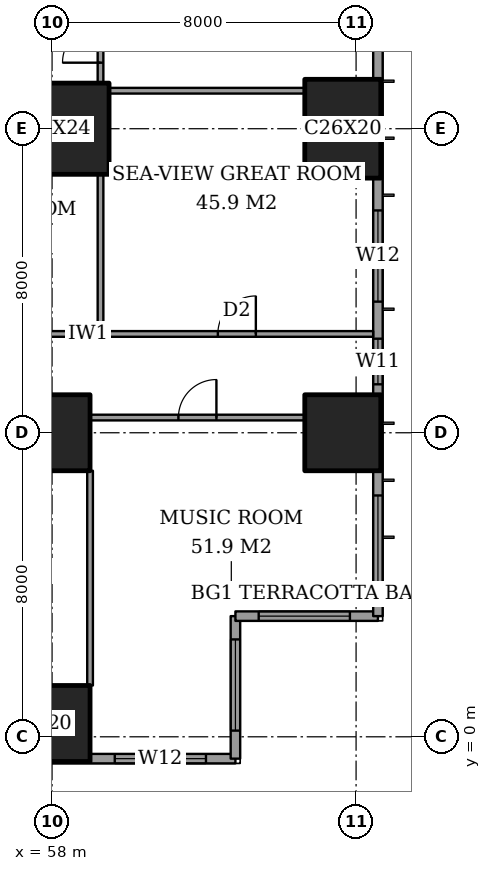
"""IFC4 building model, lengths in metres.
Left out: names, types, materials, properties, quantities, classifications, styles, units other than length and angle.
Written with IfcOpenShell. Run it as: python <this file> out.ifc"""

import sys

from ifc_helpers import new_model, si_unit, direction, frame, frame_2d, origin, origin_2d, place, context, subcontext, project, spatial, rectangle, extrude, element, fill, save


model = new_model("IFC4")
c1 = context("Model", 3, precision=1e-05, world=origin(), true_north=direction((0.0, 1.0)))
c2 = subcontext(c1, "Body", "Model", "MODEL_VIEW")
j1 = project(units=[si_unit("LENGTHUNIT", "METRE"), si_unit("PLANEANGLEUNIT", "RADIAN")], contexts=[c1])
p1 = place(None, origin())
s1 = spatial("IfcSite", under=j1, at=p1, CompositionType="ELEMENT")
p2 = place(p1, origin())
s2 = spatial("IfcBuilding", under=s1, at=p2, CompositionType="ELEMENT")
p3 = place(p2, frame((0.0, 0.0, 150.2)))
s3 = spatial("IfcBuildingStorey", under=s2, at=p3, CompositionType="ELEMENT", Elevation=150.2)
for number, where, z_axis, x_axis in (
    (1, (58.0, 0.35, 0.0), (0.0, 0.0, 1.0), (1.0, 0.0, 0.0)),
    (2, (58.0, 8.0, 0.0), (0.0, 0.0, 1.0), (1.0, 0.0, 0.0)),
):
    element("IfcColumn", number, at=place(p3, frame(where, z_axis=z_axis, x_axis=x_axis)), inside=s3, PredefinedType="COLUMN", context=c2, shape_type="SweptSolid", body=[
        extrude(rectangle(XDim=2.0, YDim=2.0, at=origin_2d()), origin(), (0.0, 0.0, 1.0), 3.6),
    ])
p4 = place(p3, frame((58.0, 16.0, 0.0), z_axis=(0.0, 0.0, 1.0), x_axis=(1.0, 0.0, 0.0)))
e3 = element("IfcColumn", 3, at=p4, inside=s3, PredefinedType="COLUMN", context=c2, shape_type="SweptSolid", body=[
    extrude(rectangle(XDim=3.0, YDim=2.4, at=origin_2d()), origin(), (0.0, 0.0, 1.0), 3.6),
])
p5 = place(p3, frame((65.65, 8.0, 0.0), z_axis=(0.0, 0.0, 1.0), x_axis=(1.0, 0.0, 0.0)))
e4 = element("IfcColumn", 4, at=p5, inside=s3, PredefinedType="COLUMN", context=c2, shape_type="SweptSolid", body=[
    extrude(rectangle(XDim=2.0, YDim=2.0, at=origin_2d()), origin(), (0.0, 0.0, 1.0), 3.6),
])
p6 = place(p3, frame((65.65, 16.0, 0.0), z_axis=(0.0, 0.0, 1.0), x_axis=(0.0, 1.0, 0.0)))
e5 = element("IfcColumn", 5, at=p6, inside=s3, PredefinedType="COLUMN", context=c2, shape_type="SweptSolid", body=[
    extrude(rectangle(XDim=2.6, YDim=2.0, at=origin_2d()), origin(), (0.0, 0.0, 1.0), 3.6),
])
p7 = place(p3, frame((41.425, -0.575, 0.0), z_axis=(0.0, 0.0, 1.0), x_axis=(1.0, 0.0, 0.0)))
e6 = element("IfcWall", 6, at=p7, inside=s3, PredefinedType="SOLIDWALL", context=c2, shape_type="SweptSolid", body=[
    extrude(rectangle(XDim=21.4, YDim=0.25, at=frame_2d((10.7, 0.0))), origin(), (0.0, 0.0, 1.0), 3.6),
])
p8 = place(p7, frame((3.05, 0.0, 0.4)))
e7 = element("IfcOpeningElement", 7, at=p8, cuts=e6, PredefinedType="OPENING", context=c2, shape_type="SweptSolid", body=[
    extrude(rectangle(XDim=2.4, YDim=2.2, at=frame_2d((1.2, 1.1))), frame((0.0, 0.135, 0.0), z_axis=(0.0, -1.0, 0.0), x_axis=(1.0, 0.0, 0.0)), (0.0, 0.0, 1.0), 0.27),
])
p9 = place(p7, frame((6.85, 0.0, 0.4)))
e8 = element("IfcOpeningElement", 8, at=p9, cuts=e6, PredefinedType="OPENING", context=c2, shape_type="SweptSolid", body=[
    extrude(rectangle(XDim=0.6, YDim=2.2, at=frame_2d((0.3, 1.1))), frame((0.0, 0.135, 0.0), z_axis=(0.0, -1.0, 0.0), x_axis=(1.0, 0.0, 0.0)), (0.0, 0.0, 1.0), 0.27),
])
p10 = place(p7, frame((9.975, 0.0, 0.4)))
e9 = element("IfcOpeningElement", 9, at=p10, cuts=e6, PredefinedType="OPENING", context=c2, shape_type="SweptSolid", body=[
    extrude(rectangle(XDim=1.2, YDim=2.2, at=frame_2d((0.6, 1.1))), frame((0.0, 0.135, 0.0), z_axis=(0.0, -1.0, 0.0), x_axis=(1.0, 0.0, 0.0)), (0.0, 0.0, 1.0), 0.27),
])
p11 = place(p7, frame((12.375, 0.0, 0.4)))
e10 = element("IfcOpeningElement", 10, at=p11, cuts=e6, PredefinedType="OPENING", context=c2, shape_type="SweptSolid", body=[
    extrude(rectangle(XDim=2.4, YDim=2.2, at=frame_2d((1.2, 1.1))), frame((0.0, 0.135, 0.0), z_axis=(0.0, -1.0, 0.0), x_axis=(1.0, 0.0, 0.0)), (0.0, 0.0, 1.0), 0.27),
])
p12 = place(p7, frame((18.225, 0.0, 0.4)))
e11 = element("IfcOpeningElement", 11, at=p12, cuts=e6, PredefinedType="OPENING", context=c2, shape_type="SweptSolid", body=[
    extrude(rectangle(XDim=2.4, YDim=2.2, at=frame_2d((1.2, 1.1))), frame((0.0, 0.135, 0.0), z_axis=(0.0, -1.0, 0.0), x_axis=(1.0, 0.0, 0.0)), (0.0, 0.0, 1.0), 0.27),
])
p13 = place(p3, frame((62.825, -0.575, 0.0), z_axis=(0.0, 0.0, 1.0), x_axis=(0.0, 1.0, 0.0)))
e12 = element("IfcWall", 12, at=p13, inside=s3, PredefinedType="SOLIDWALL", context=c2, shape_type="SweptSolid", body=[
    extrude(rectangle(XDim=3.75, YDim=0.25, at=frame_2d((1.875, 0.0))), origin(), (0.0, 0.0, 1.0), 3.6),
])
p14 = place(p13, frame((0.738, 0.0, 0.4)))
e13 = element("IfcOpeningElement", 13, at=p14, cuts=e12, PredefinedType="OPENING", context=c2, shape_type="SweptSolid", body=[
    extrude(rectangle(XDim=2.4, YDim=2.2, at=frame_2d((1.2, 1.1))), frame((0.0, 0.135, 0.0), z_axis=(0.0, -1.0, 0.0), x_axis=(1.0, 0.0, 0.0)), (0.0, 0.0, 1.0), 0.27),
])
p15 = place(p3, frame((62.825, 3.175, 0.0), z_axis=(0.0, 0.0, 1.0), x_axis=(1.0, 0.0, 0.0)))
e14 = element("IfcWall", 14, at=p15, inside=s3, PredefinedType="SOLIDWALL", context=c2, shape_type="SweptSolid", body=[
    extrude(rectangle(XDim=3.75, YDim=0.25, at=frame_2d((1.875, 0.0))), origin(), (0.0, 0.0, 1.0), 3.6),
])
p16 = place(p15, frame((0.613, 0.0, 0.4)))
e15 = element("IfcOpeningElement", 15, at=p16, cuts=e14, PredefinedType="OPENING", context=c2, shape_type="SweptSolid", body=[
    extrude(rectangle(XDim=2.4, YDim=2.2, at=frame_2d((1.2, 1.1))), frame((0.0, 0.135, 0.0), z_axis=(0.0, -1.0, 0.0), x_axis=(1.0, 0.0, 0.0)), (0.0, 0.0, 1.0), 0.27),
])
p17 = place(p3, frame((66.575, 3.175, 0.0), z_axis=(0.0, 0.0, 1.0), x_axis=(0.0, 1.0, 0.0)))
e16 = element("IfcWall", 16, at=p17, inside=s3, PredefinedType="SOLIDWALL", context=c2, shape_type="SweptSolid", body=[
    extrude(rectangle(XDim=41.65, YDim=0.25, at=frame_2d((20.825, 0.0))), origin(), (0.0, 0.0, 1.0), 3.6),
])
p18 = place(p17, frame((0.775, 0.0, 0.4)))
e17 = element("IfcOpeningElement", 17, at=p18, cuts=e16, PredefinedType="OPENING", context=c2, shape_type="SweptSolid", body=[
    extrude(rectangle(XDim=2.4, YDim=2.2, at=frame_2d((1.2, 1.1))), frame((0.0, 0.135, 0.0), z_axis=(0.0, -1.0, 0.0), x_axis=(1.0, 0.0, 0.0)), (0.0, 0.0, 1.0), 0.27),
])
p19 = place(p17, frame((6.1, 0.0, 0.4)))
e18 = element("IfcOpeningElement", 18, at=p19, cuts=e16, PredefinedType="OPENING", context=c2, shape_type="SweptSolid", body=[
    extrude(rectangle(XDim=1.2, YDim=2.2, at=frame_2d((0.6, 1.1))), frame((0.0, 0.135, 0.0), z_axis=(0.0, -1.0, 0.0), x_axis=(1.0, 0.0, 0.0)), (0.0, 0.0, 1.0), 0.27),
])
p20 = place(p17, frame((8.275, 0.0, 0.4)))
e19 = element("IfcOpeningElement", 19, at=p20, cuts=e16, PredefinedType="OPENING", context=c2, shape_type="SweptSolid", body=[
    extrude(rectangle(XDim=2.4, YDim=2.2, at=frame_2d((1.2, 1.1))), frame((0.0, 0.135, 0.0), z_axis=(0.0, -1.0, 0.0), x_axis=(1.0, 0.0, 0.0)), (0.0, 0.0, 1.0), 0.27),
])
p21 = place(p17, frame((15.775, 0.0, 0.4)))
e20 = element("IfcOpeningElement", 20, at=p21, cuts=e16, PredefinedType="OPENING", context=c2, shape_type="SweptSolid", body=[
    extrude(rectangle(XDim=2.4, YDim=2.2, at=frame_2d((1.2, 1.1))), frame((0.0, 0.135, 0.0), z_axis=(0.0, -1.0, 0.0), x_axis=(1.0, 0.0, 0.0)), (0.0, 0.0, 1.0), 0.27),
])
p22 = place(p17, frame((23.475, 0.0, 0.4)))
e21 = element("IfcOpeningElement", 21, at=p22, cuts=e16, PredefinedType="OPENING", context=c2, shape_type="SweptSolid", body=[
    extrude(rectangle(XDim=2.4, YDim=2.2, at=frame_2d((1.2, 1.1))), frame((0.0, 0.135, 0.0), z_axis=(0.0, -1.0, 0.0), x_axis=(1.0, 0.0, 0.0)), (0.0, 0.0, 1.0), 0.27),
])
p23 = place(p17, frame((30.875, 0.0, 0.4)))
e22 = element("IfcOpeningElement", 22, at=p23, cuts=e16, PredefinedType="OPENING", context=c2, shape_type="SweptSolid", body=[
    extrude(rectangle(XDim=2.4, YDim=2.2, at=frame_2d((1.2, 1.1))), frame((0.0, 0.135, 0.0), z_axis=(0.0, -1.0, 0.0), x_axis=(1.0, 0.0, 0.0)), (0.0, 0.0, 1.0), 0.27),
])
p24 = place(p17, frame((34.325, 0.0, 0.4)))
e23 = element("IfcOpeningElement", 23, at=p24, cuts=e16, PredefinedType="OPENING", context=c2, shape_type="SweptSolid", body=[
    extrude(rectangle(XDim=1.2, YDim=2.2, at=frame_2d((0.6, 1.1))), frame((0.0, 0.135, 0.0), z_axis=(0.0, -1.0, 0.0), x_axis=(1.0, 0.0, 0.0)), (0.0, 0.0, 1.0), 0.27),
])
p25 = place(p17, frame((38.475, 0.0, 0.4)))
e24 = element("IfcOpeningElement", 24, at=p25, cuts=e16, PredefinedType="OPENING", context=c2, shape_type="SweptSolid", body=[
    extrude(rectangle(XDim=2.4, YDim=2.2, at=frame_2d((1.2, 1.1))), frame((0.0, 0.135, 0.0), z_axis=(0.0, -1.0, 0.0), x_axis=(1.0, 0.0, 0.0)), (0.0, 0.0, 1.0), 0.27),
])
p26 = place(p3, frame((59.0, 8.4, 0.0), z_axis=(0.0, 0.0, 1.0), x_axis=(1.0, 0.0, 0.0)))
e25 = element("IfcWall", 25, at=p26, inside=s3, PredefinedType="PARTITIONING", context=c2, shape_type="SweptSolid", body=[
    extrude(rectangle(XDim=5.65, YDim=0.15, at=frame_2d((2.825, 0.0))), origin(), (0.0, 0.0, 1.0), 3.35),
])
p27 = place(p26, frame((2.325, 0.0, 0.0)))
e26 = element("IfcOpeningElement", 26, at=p27, cuts=e25, PredefinedType="OPENING", context=c2, shape_type="SweptSolid", body=[
    extrude(rectangle(XDim=1.0, YDim=2.1, at=frame_2d((0.5, 1.05))), frame((0.0, 0.085, 0.0), z_axis=(0.0, -1.0, 0.0), x_axis=(1.0, 0.0, 0.0)), (0.0, 0.0, 1.0), 0.17),
])
p28 = place(p3, frame((41.439, 10.6, 0.0), z_axis=(0.0, 0.0, 1.0), x_axis=(1.0, 0.0, 0.0)))
e27 = element("IfcWall", 27, at=p28, inside=s3, PredefinedType="PARTITIONING", context=c2, shape_type="SweptSolid", body=[
    extrude(rectangle(XDim=25.011, YDim=0.15, at=frame_2d((12.505, 0.0))), origin(), (0.0, 0.0, 1.0), 3.35),
])
p29 = place(p28, frame((11.961, 0.0, 0.0)))
e28 = element("IfcOpeningElement", 28, at=p29, cuts=e27, PredefinedType="OPENING", context=c2, shape_type="SweptSolid", body=[
    extrude(rectangle(XDim=1.0, YDim=2.1, at=frame_2d((0.5, 1.05))), frame((0.0, 0.085, 0.0), z_axis=(0.0, -1.0, 0.0), x_axis=(1.0, 0.0, 0.0)), (0.0, 0.0, 1.0), 0.17),
])
p30 = place(p28, frame((20.924, 0.0, 0.0)))
e29 = element("IfcOpeningElement", 29, at=p30, cuts=e27, PredefinedType="OPENING", context=c2, shape_type="SweptSolid", body=[
    extrude(rectangle(XDim=1.0, YDim=2.1, at=frame_2d((0.5, 1.05))), frame((0.0, 0.085, 0.0), z_axis=(0.0, -1.0, 0.0), x_axis=(1.0, 0.0, 0.0)), (0.0, 0.0, 1.0), 0.17),
])
p31 = place(p28, frame((15.249, 0.0, 0.0)))
e30 = element("IfcOpeningElement", 30, at=p31, cuts=e27, PredefinedType="OPENING", context=c2, shape_type="SweptSolid", body=[
    extrude(rectangle(XDim=0.9, YDim=2.1, at=frame_2d((0.45, 1.05))), frame((0.0, 0.085, 0.0), z_axis=(0.0, -1.0, 0.0), x_axis=(1.0, 0.0, 0.0)), (0.0, 0.0, 1.0), 0.17),
])
p32 = place(p28, frame((9.661, 0.0, 0.0)))
e31 = element("IfcOpeningElement", 31, at=p32, cuts=e27, PredefinedType="OPENING", context=c2, shape_type="SweptSolid", body=[
    extrude(rectangle(XDim=1.0, YDim=2.1, at=frame_2d((0.5, 1.05))), frame((0.0, 0.085, 0.0), z_axis=(0.0, -1.0, 0.0), x_axis=(1.0, 0.0, 0.0)), (0.0, 0.0, 1.0), 0.17),
])
p33 = place(p28, frame((7.311, 0.0, 0.0)))
e32 = element("IfcOpeningElement", 32, at=p33, cuts=e27, PredefinedType="OPENING", context=c2, shape_type="SweptSolid", body=[
    extrude(rectangle(XDim=0.9, YDim=2.1, at=frame_2d((0.45, 1.05))), frame((0.0, 0.085, 0.0), z_axis=(0.0, -1.0, 0.0), x_axis=(1.0, 0.0, 0.0)), (0.0, 0.0, 1.0), 0.17),
])
p34 = place(p28, frame((2.836, 0.0, 0.0)))
e33 = element("IfcOpeningElement", 33, at=p34, cuts=e27, PredefinedType="OPENING", context=c2, shape_type="SweptSolid", body=[
    extrude(rectangle(XDim=1.0, YDim=2.1, at=frame_2d((0.5, 1.05))), frame((0.0, 0.085, 0.0), z_axis=(0.0, -1.0, 0.0), x_axis=(1.0, 0.0, 0.0)), (0.0, 0.0, 1.0), 0.17),
])
p35 = place(p3, frame((59.5, 17.0, 0.0), z_axis=(0.0, 0.0, 1.0), x_axis=(1.0, 0.0, 0.0)))
e34 = element("IfcWall", 34, at=p35, inside=s3, PredefinedType="PARTITIONING", context=c2, shape_type="SweptSolid", body=[
    extrude(rectangle(XDim=5.15, YDim=0.15, at=frame_2d((2.575, 0.0))), origin(), (0.0, 0.0, 1.0), 3.35),
])
p36 = place(p3, frame((59.0, 1.35, 0.0), z_axis=(0.0, 0.0, 1.0), x_axis=(0.0, 1.0, 0.0)))
e35 = element("IfcWall", 35, at=p36, inside=s3, PredefinedType="PARTITIONING", context=c2, shape_type="SweptSolid", body=[
    extrude(rectangle(XDim=5.65, YDim=0.15, at=frame_2d((2.825, 0.0))), origin(), (0.0, 0.0, 1.0), 3.35),
])
p37 = place(p3, frame((59.275, 10.6, 0.0), z_axis=(0.0, 0.0, 1.0), x_axis=(0.0, 1.0, 0.0)))
e36 = element("IfcWall", 36, at=p37, inside=s3, PredefinedType="PARTITIONING", context=c2, shape_type="SweptSolid", body=[
    extrude(rectangle(XDim=4.2, YDim=0.15, at=frame_2d((2.1, 0.0))), origin(), (0.0, 0.0, 1.0), 3.35),
])
p38 = place(p3, frame((59.275, 17.2, 0.0), z_axis=(0.0, 0.0, 1.0), x_axis=(0.0, 1.0, 0.0)))
e37 = element("IfcWall", 37, at=p38, inside=s3, PredefinedType="PARTITIONING", context=c2, shape_type="SweptSolid", body=[
    extrude(rectangle(XDim=2.45, YDim=0.15, at=frame_2d((1.225, 0.0))), origin(), (0.0, 0.0, 1.0), 3.35),
])
p39 = place(p38, frame((0.538, 0.0, 0.0)))
e38 = element("IfcOpeningElement", 38, at=p39, cuts=e37, PredefinedType="OPENING", context=c2, shape_type="SweptSolid", body=[
    extrude(rectangle(XDim=1.0, YDim=2.1, at=frame_2d((0.5, 1.05))), frame((0.0, 0.085, 0.0), z_axis=(0.0, -1.0, 0.0), x_axis=(1.0, 0.0, 0.0)), (0.0, 0.0, 1.0), 0.17),
])
p40 = place(p12, origin())
e39 = element("IfcWindow", 39, at=p40, inside=s3, PartitioningType="SINGLE_PANEL", PredefinedType="WINDOW", context=c2, shape_type="SweptSolid", body=[
    extrude(rectangle(XDim=2.4, YDim=2.2, at=frame_2d((1.2, 1.1))), frame((0.0, 0.03, 0.0), z_axis=(0.0, -1.0, 0.0), x_axis=(1.0, 0.0, 0.0)), (0.0, 0.0, 1.0), 0.06),
])
fill(e11, e39)
p41 = place(p14, origin())
e40 = element("IfcWindow", 40, at=p41, inside=s3, PartitioningType="SINGLE_PANEL", PredefinedType="WINDOW", context=c2, shape_type="SweptSolid", body=[
    extrude(rectangle(XDim=2.4, YDim=2.2, at=frame_2d((1.2, 1.1))), frame((0.0, 0.03, 0.0), z_axis=(0.0, -1.0, 0.0), x_axis=(1.0, 0.0, 0.0)), (0.0, 0.0, 1.0), 0.06),
])
fill(e13, e40)
p42 = place(p16, origin())
e41 = element("IfcWindow", 41, at=p42, inside=s3, PartitioningType="SINGLE_PANEL", PredefinedType="WINDOW", context=c2, shape_type="SweptSolid", body=[
    extrude(rectangle(XDim=2.4, YDim=2.2, at=frame_2d((1.2, 1.1))), frame((0.0, 0.03, 0.0), z_axis=(0.0, -1.0, 0.0), x_axis=(1.0, 0.0, 0.0)), (0.0, 0.0, 1.0), 0.06),
])
fill(e15, e41)
p43 = place(p18, origin())
e42 = element("IfcWindow", 42, at=p43, inside=s3, PartitioningType="SINGLE_PANEL", PredefinedType="WINDOW", context=c2, shape_type="SweptSolid", body=[
    extrude(rectangle(XDim=2.4, YDim=2.2, at=frame_2d((1.2, 1.1))), frame((0.0, 0.03, 0.0), z_axis=(0.0, -1.0, 0.0), x_axis=(1.0, 0.0, 0.0)), (0.0, 0.0, 1.0), 0.06),
])
fill(e17, e42)
p44 = place(p19, origin())
e43 = element("IfcWindow", 43, at=p44, inside=s3, PartitioningType="SINGLE_PANEL", PredefinedType="WINDOW", context=c2, shape_type="SweptSolid", body=[
    extrude(rectangle(XDim=1.2, YDim=2.2, at=frame_2d((0.6, 1.1))), frame((0.0, 0.03, 0.0), z_axis=(0.0, -1.0, 0.0), x_axis=(1.0, 0.0, 0.0)), (0.0, 0.0, 1.0), 0.06),
])
fill(e18, e43)
p45 = place(p20, origin())
e44 = element("IfcWindow", 44, at=p45, inside=s3, PartitioningType="SINGLE_PANEL", PredefinedType="WINDOW", context=c2, shape_type="SweptSolid", body=[
    extrude(rectangle(XDim=2.4, YDim=2.2, at=frame_2d((1.2, 1.1))), frame((0.0, 0.03, 0.0), z_axis=(0.0, -1.0, 0.0), x_axis=(1.0, 0.0, 0.0)), (0.0, 0.0, 1.0), 0.06),
])
fill(e19, e44)
p46 = place(p27, origin())
e45 = element("IfcDoor", 45, at=p46, inside=s3, OperationType="SINGLE_SWING_LEFT", PredefinedType="DOOR", context=c2, shape_type="SweptSolid", body=[
    extrude(rectangle(XDim=1.0, YDim=2.1, at=frame_2d((0.5, 1.05))), frame((0.0, 0.025, 0.0), z_axis=(0.0, -1.0, 0.0), x_axis=(1.0, 0.0, 0.0)), (0.0, 0.0, 1.0), 0.05),
])
fill(e26, e45)
p47 = place(p30, origin())
e46 = element("IfcDoor", 46, at=p47, inside=s3, OperationType="SINGLE_SWING_LEFT", PredefinedType="DOOR", context=c2, shape_type="SweptSolid", body=[
    extrude(rectangle(XDim=1.0, YDim=2.1, at=frame_2d((0.5, 1.05))), frame((0.0, 0.025, 0.0), z_axis=(0.0, -1.0, 0.0), x_axis=(1.0, 0.0, 0.0)), (0.0, 0.0, 1.0), 0.05),
])
fill(e29, e46)
p48 = place(p39, origin())
e47 = element("IfcDoor", 47, at=p48, inside=s3, OperationType="SINGLE_SWING_RIGHT", PredefinedType="DOOR", context=c2, shape_type="SweptSolid", body=[
    extrude(rectangle(XDim=1.0, YDim=2.1, at=frame_2d((0.5, 1.05))), frame((0.0, 0.025, 0.0), z_axis=(0.0, -1.0, 0.0), x_axis=(1.0, 0.0, 0.0)), (0.0, 0.0, 1.0), 0.05),
])
fill(e38, e47)
save(model, sys.argv[1])
